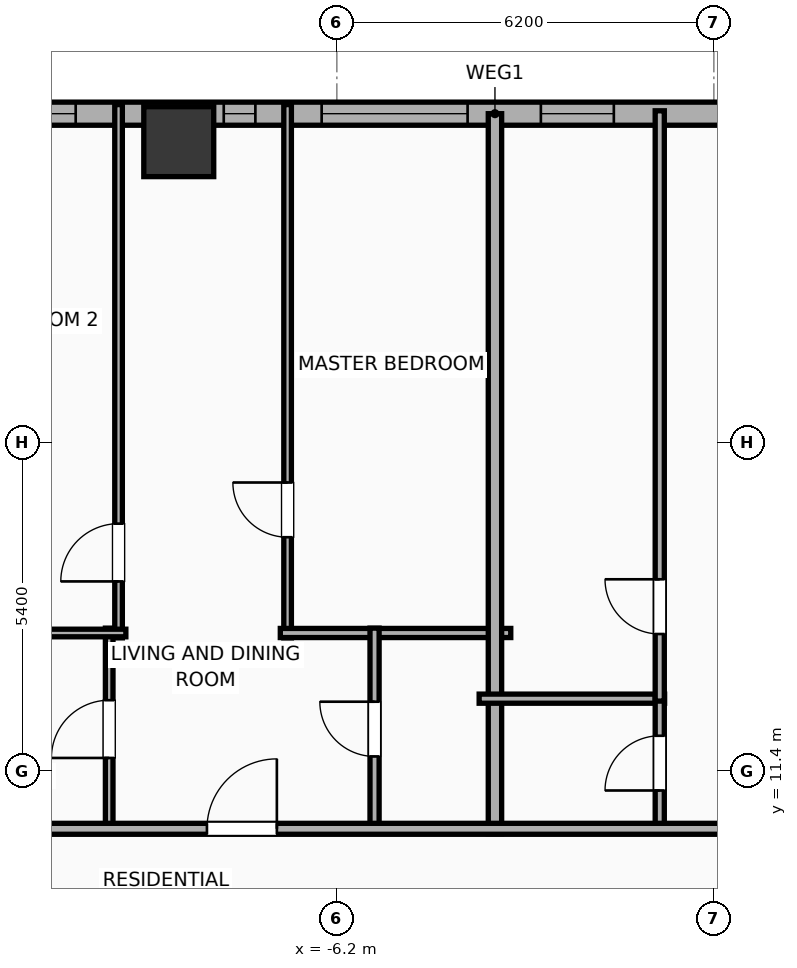
"""IFC4 building model, lengths in metres.
Left out: names, types, materials, properties, quantities, classifications, styles, units other than length and angle.
Written with IfcOpenShell. Run it as: python <this file> out.ifc"""

import sys

from ifc_helpers import new_model, si_unit, direction, frame, frame_2d, origin, origin_2d, place, context, subcontext, project, spatial, rectangle, hollow_rectangle, extrude, element, fill, save


model = new_model("IFC4")
c1 = context("Model", 3, precision=1e-05, world=origin(), true_north=direction((0.0, 1.0)))
c2 = subcontext(c1, "Body", "Model", "MODEL_VIEW")
j1 = project(units=[si_unit("LENGTHUNIT", "METRE"), si_unit("PLANEANGLEUNIT", "RADIAN")], contexts=[c1])
p1 = place(None, origin())
s1 = spatial("IfcSite", under=j1, at=p1, CompositionType="ELEMENT")
p2 = place(p1, origin())
s2 = spatial("IfcBuilding", under=s1, at=p2, CompositionType="ELEMENT")
p3 = place(p2, frame((0.0, 0.0, 72.8)))
s3 = spatial("IfcBuildingStorey", under=s2, at=p3, CompositionType="ELEMENT", Elevation=72.8)
p4 = place(p3, frame((-8.8, 21.75, 0.0), z_axis=(0.0, 0.0, 1.0), x_axis=(1.0, 0.0, 0.0)))
e1 = element("IfcColumn", 1, at=p4, inside=s3, PredefinedType="COLUMN", context=c2, shape_type="SweptSolid", body=[
    extrude(hollow_rectangle(XDim=1.15, YDim=1.15, WallThickness=0.04, at=origin_2d()), origin(), (0.0, 0.0, 1.0), 3.9),
])
p5 = place(p3, frame((-29.581, 22.21, 0.0), z_axis=(0.0, 0.0, 1.0), x_axis=(1.0, 0.0, 0.0)))
e2 = element("IfcWall", 2, at=p5, inside=s3, PredefinedType="ELEMENTEDWALL", context=c2, shape_type="SweptSolid", body=[
    extrude(rectangle(XDim=51.963, YDim=0.38, at=frame_2d((25.981, 0.0))), origin(), (0.0, 0.0, 1.0), 3.65),
])
p6 = place(p5, frame((5.81, 0.0, 0.75)))
e3 = element("IfcOpeningElement", 3, at=p6, cuts=e2, PredefinedType="OPENING", context=c2, shape_type="SweptSolid", body=[
    extrude(rectangle(XDim=2.4, YDim=2.1, at=frame_2d((1.2, 1.05))), frame((0.0, 0.2, 0.0), z_axis=(0.0, -1.0, 0.0), x_axis=(1.0, 0.0, 0.0)), (0.0, 0.0, 1.0), 0.4),
])
p7 = place(p5, frame((23.131, 0.0, 0.75)))
e4 = element("IfcOpeningElement", 4, at=p7, cuts=e2, PredefinedType="OPENING", context=c2, shape_type="SweptSolid", body=[
    extrude(rectangle(XDim=2.4, YDim=2.1, at=frame_2d((1.2, 1.05))), frame((0.0, 0.2, 0.0), z_axis=(0.0, -1.0, 0.0), x_axis=(1.0, 0.0, 0.0)), (0.0, 0.0, 1.0), 0.4),
])
p8 = place(p5, frame((43.752, 0.0, 0.75)))
e5 = element("IfcOpeningElement", 5, at=p8, cuts=e2, PredefinedType="OPENING", context=c2, shape_type="SweptSolid", body=[
    extrude(rectangle(XDim=2.4, YDim=2.1, at=frame_2d((1.2, 1.05))), frame((0.0, 0.2, 0.0), z_axis=(0.0, -1.0, 0.0), x_axis=(1.0, 0.0, 0.0)), (0.0, 0.0, 1.0), 0.4),
])
p9 = place(p5, frame((2.819, 0.0, 0.75)))
e6 = element("IfcOpeningElement", 6, at=p9, cuts=e2, PredefinedType="OPENING", context=c2, shape_type="SweptSolid", body=[
    extrude(rectangle(XDim=1.2, YDim=2.05, at=frame_2d((0.6, 1.025))), frame((0.0, 0.2, 0.0), z_axis=(0.0, -1.0, 0.0), x_axis=(1.0, 0.0, 0.0)), (0.0, 0.0, 1.0), 0.4),
])
p10 = place(p5, frame((11.781, 0.0, 0.75)))
e7 = element("IfcOpeningElement", 7, at=p10, cuts=e2, PredefinedType="OPENING", context=c2, shape_type="SweptSolid", body=[
    extrude(rectangle(XDim=1.2, YDim=2.05, at=frame_2d((0.6, 1.025))), frame((0.0, 0.2, 0.0), z_axis=(0.0, -1.0, 0.0), x_axis=(1.0, 0.0, 0.0)), (0.0, 0.0, 1.0), 0.4),
])
p11 = place(p5, frame((8.781, 0.0, 0.75)))
e8 = element("IfcOpeningElement", 8, at=p11, cuts=e2, PredefinedType="OPENING", context=c2, shape_type="SweptSolid", body=[
    extrude(rectangle(XDim=0.85, YDim=2.05, at=frame_2d((0.425, 1.025))), frame((0.0, 0.2, 0.0), z_axis=(0.0, -1.0, 0.0), x_axis=(1.0, 0.0, 0.0)), (0.0, 0.0, 1.0), 0.4),
])
p12 = place(p5, frame((14.876, 0.0, 0.75)))
e9 = element("IfcOpeningElement", 9, at=p12, cuts=e2, PredefinedType="OPENING", context=c2, shape_type="SweptSolid", body=[
    extrude(rectangle(XDim=1.2, YDim=2.05, at=frame_2d((0.6, 1.025))), frame((0.0, 0.2, 0.0), z_axis=(0.0, -1.0, 0.0), x_axis=(1.0, 0.0, 0.0)), (0.0, 0.0, 1.0), 0.4),
])
p13 = place(p5, frame((21.521, 0.0, 0.75)))
e10 = element("IfcOpeningElement", 10, at=p13, cuts=e2, PredefinedType="OPENING", context=c2, shape_type="SweptSolid", body=[
    extrude(rectangle(XDim=0.52, YDim=2.05, at=frame_2d((0.26, 1.025))), frame((0.0, 0.2, 0.0), z_axis=(0.0, -1.0, 0.0), x_axis=(1.0, 0.0, 0.0)), (0.0, 0.0, 1.0), 0.4),
])
p14 = place(p5, frame((17.886, 0.0, 0.75)))
e11 = element("IfcOpeningElement", 11, at=p14, cuts=e2, PredefinedType="OPENING", context=c2, shape_type="SweptSolid", body=[
    extrude(rectangle(XDim=1.2, YDim=2.05, at=frame_2d((0.6, 1.025))), frame((0.0, 0.2, 0.0), z_axis=(0.0, -1.0, 0.0), x_axis=(1.0, 0.0, 0.0)), (0.0, 0.0, 1.0), 0.4),
])
p15 = place(p5, frame((26.736, 0.0, 0.75)))
e12 = element("IfcOpeningElement", 12, at=p15, cuts=e2, PredefinedType="OPENING", context=c2, shape_type="SweptSolid", body=[
    extrude(rectangle(XDim=1.2, YDim=2.05, at=frame_2d((0.6, 1.025))), frame((0.0, 0.2, 0.0), z_axis=(0.0, -1.0, 0.0), x_axis=(1.0, 0.0, 0.0)), (0.0, 0.0, 1.0), 0.4),
])
p16 = place(p5, frame((31.976, 0.0, 0.75)))
e13 = element("IfcOpeningElement", 13, at=p16, cuts=e2, PredefinedType="OPENING", context=c2, shape_type="SweptSolid", body=[
    extrude(rectangle(XDim=1.2, YDim=2.05, at=frame_2d((0.6, 1.025))), frame((0.0, 0.2, 0.0), z_axis=(0.0, -1.0, 0.0), x_axis=(1.0, 0.0, 0.0)), (0.0, 0.0, 1.0), 0.4),
])
p17 = place(p5, frame((38.181, 0.0, 0.75)))
e14 = element("IfcOpeningElement", 14, at=p17, cuts=e2, PredefinedType="OPENING", context=c2, shape_type="SweptSolid", body=[
    extrude(rectangle(XDim=1.2, YDim=2.05, at=frame_2d((0.6, 1.025))), frame((0.0, 0.2, 0.0), z_axis=(0.0, -1.0, 0.0), x_axis=(1.0, 0.0, 0.0)), (0.0, 0.0, 1.0), 0.4),
])
p18 = place(p5, frame((35.486, 0.0, 0.75)))
e15 = element("IfcOpeningElement", 15, at=p18, cuts=e2, PredefinedType="OPENING", context=c2, shape_type="SweptSolid", body=[
    extrude(rectangle(XDim=1.2, YDim=2.05, at=frame_2d((0.6, 1.025))), frame((0.0, 0.2, 0.0), z_axis=(0.0, -1.0, 0.0), x_axis=(1.0, 0.0, 0.0)), (0.0, 0.0, 1.0), 0.4),
])
p19 = place(p5, frame((42.411, 0.0, 0.75)))
e16 = element("IfcOpeningElement", 16, at=p19, cuts=e2, PredefinedType="OPENING", context=c2, shape_type="SweptSolid", body=[
    extrude(rectangle(XDim=0.85, YDim=2.05, at=frame_2d((0.425, 1.025))), frame((0.0, 0.2, 0.0), z_axis=(0.0, -1.0, 0.0), x_axis=(1.0, 0.0, 0.0)), (0.0, 0.0, 1.0), 0.4),
])
p20 = place(p5, frame((47.943, 0.0, 0.75)))
e17 = element("IfcOpeningElement", 17, at=p20, cuts=e2, PredefinedType="OPENING", context=c2, shape_type="SweptSolid", body=[
    extrude(rectangle(XDim=1.2, YDim=2.05, at=frame_2d((0.6, 1.025))), frame((0.0, 0.2, 0.0), z_axis=(0.0, -1.0, 0.0), x_axis=(1.0, 0.0, 0.0)), (0.0, 0.0, 1.0), 0.4),
])
p21 = place(p5, frame((49.901, 0.0, 0.75)))
e18 = element("IfcOpeningElement", 18, at=p21, cuts=e2, PredefinedType="OPENING", context=c2, shape_type="SweptSolid", body=[
    extrude(rectangle(XDim=1.2, YDim=2.05, at=frame_2d((0.6, 1.025))), frame((0.0, 0.2, 0.0), z_axis=(0.0, -1.0, 0.0), x_axis=(1.0, 0.0, 0.0)), (0.0, 0.0, 1.0), 0.4),
])
p22 = place(p3, frame((-9.79, 13.59, 0.0), z_axis=(0.0, 0.0, 1.0), x_axis=(0.0, 1.0, 0.0)))
e19 = element("IfcWall", 19, at=p22, inside=s3, PredefinedType="PARTITIONING", context=c2, shape_type="SweptSolid", body=[
    extrude(rectangle(XDim=8.77, YDim=0.125, at=frame_2d((4.385, 0.0))), origin(), (0.0, 0.0, 1.0), 2.94),
])
p23 = place(p22, frame((0.928, 0.0, 0.0)))
e20 = element("IfcOpeningElement", 20, at=p23, cuts=e19, PredefinedType="OPENING", context=c2, shape_type="SweptSolid", body=[
    extrude(rectangle(XDim=0.95, YDim=2.05, at=frame_2d((0.475, 1.025))), frame((0.0, 0.073, 0.0), z_axis=(0.0, -1.0, 0.0), x_axis=(1.0, 0.0, 0.0)), (0.0, 0.0, 1.0), 0.145),
])
p24 = place(p3, frame((-7.01, 13.59, 0.0), z_axis=(0.0, 0.0, 1.0), x_axis=(0.0, 1.0, 0.0)))
e21 = element("IfcWall", 21, at=p24, inside=s3, PredefinedType="PARTITIONING", context=c2, shape_type="SweptSolid", body=[
    extrude(rectangle(XDim=8.77, YDim=0.125, at=frame_2d((4.385, 0.0))), origin(), (0.0, 0.0, 1.0), 3.65),
])
p25 = place(p24, frame((1.655, 0.0, 0.0)))
e22 = element("IfcOpeningElement", 22, at=p25, cuts=e21, PredefinedType="OPENING", context=c2, shape_type="SweptSolid", body=[
    extrude(rectangle(XDim=0.9, YDim=2.05, at=frame_2d((0.45, 1.025))), frame((0.0, 0.073, 0.0), z_axis=(0.0, -1.0, 0.0), x_axis=(1.0, 0.0, 0.0)), (0.0, 0.0, 1.0), 0.145),
])
p26 = place(p3, frame((-7.13, 13.67, 0.0), z_axis=(0.0, 0.0, 1.0), x_axis=(1.0, 0.0, 0.0)))
e23 = element("IfcWall", 23, at=p26, inside=s3, PredefinedType="PLUMBINGWALL", context=c2, shape_type="SweptSolid", body=[
    extrude(rectangle(XDim=3.79, YDim=0.15, at=frame_2d((1.895, 0.0))), origin(), (0.0, 0.0, 1.0), 3.65),
])
p27 = place(p3, frame((-9.944, 10.43, 0.0), z_axis=(0.0, 0.0, 1.0), x_axis=(0.0, 1.0, 0.0)))
e24 = element("IfcWall", 24, at=p27, inside=s3, PredefinedType="PARTITIONING", context=c2, shape_type="SweptSolid", body=[
    extrude(rectangle(XDim=3.32, YDim=0.125, at=frame_2d((1.66, 0.0))), origin(), (0.0, 0.0, 1.0), 3.65),
])
p28 = place(p27, frame((1.185, 0.0, 0.0)))
e25 = element("IfcOpeningElement", 25, at=p28, cuts=e24, PredefinedType="OPENING", context=c2, shape_type="SweptSolid", body=[
    extrude(rectangle(XDim=0.95, YDim=2.05, at=frame_2d((0.475, 1.025))), frame((0.0, 0.073, 0.0), z_axis=(0.0, -1.0, 0.0), x_axis=(1.0, 0.0, 0.0)), (0.0, 0.0, 1.0), 0.145),
])
p29 = place(p3, frame((-12.475, 13.67, 0.0), z_axis=(0.0, 0.0, 1.0), x_axis=(1.0, 0.0, 0.0)))
e26 = element("IfcWall", 26, at=p29, inside=s3, PredefinedType="PARTITIONING", context=c2, shape_type="SweptSolid", body=[
    extrude(rectangle(XDim=2.805, YDim=0.125, at=frame_2d((1.403, 0.0))), origin(), (0.0, 0.0, 1.0), 3.65),
])
p30 = place(p3, frame((-5.58, 10.43, 0.0), z_axis=(0.0, 0.0, 1.0), x_axis=(0.0, 1.0, 0.0)))
e27 = element("IfcWall", 27, at=p30, inside=s3, PredefinedType="PLUMBINGWALL", context=c2, shape_type="SweptSolid", body=[
    extrude(rectangle(XDim=3.32, YDim=0.15, at=frame_2d((1.66, 0.0))), origin(), (0.0, 0.0, 1.0), 3.65),
])
p31 = place(p30, frame((1.21, 0.0, 0.0)))
e28 = element("IfcOpeningElement", 28, at=p31, cuts=e27, PredefinedType="OPENING", context=c2, shape_type="SweptSolid", body=[
    extrude(rectangle(XDim=0.9, YDim=2.05, at=frame_2d((0.45, 1.025))), frame((0.0, 0.085, 0.0), z_axis=(0.0, -1.0, 0.0), x_axis=(1.0, 0.0, 0.0)), (0.0, 0.0, 1.0), 0.17),
])
p32 = place(p3, frame((-3.6, 10.37, 0.0), z_axis=(0.0, 0.0, 1.0), x_axis=(0.0, 1.0, 0.0)))
e29 = element("IfcWall", 29, at=p32, inside=s3, PredefinedType="PARTITIONING", context=c2, shape_type="SweptSolid", body=[
    extrude(rectangle(XDim=11.84, YDim=0.22, at=frame_2d((5.92, 0.0))), origin(), (0.0, 0.0, 1.0), 3.65),
])
p33 = place(p3, frame((-3.86, 12.59, 0.0), z_axis=(0.0, 0.0, 1.0), x_axis=(1.0, 0.0, 0.0)))
e30 = element("IfcWall", 30, at=p33, inside=s3, PredefinedType="PLUMBINGWALL", context=c2, shape_type="SweptSolid", body=[
    extrude(rectangle(XDim=3.05, YDim=0.15, at=frame_2d((1.525, 0.0))), origin(), (0.0, 0.0, 1.0), 3.65),
])
p34 = place(p3, frame((-0.89, 10.43, 0.0), z_axis=(0.0, 0.0, 1.0), x_axis=(0.0, 1.0, 0.0)))
e31 = element("IfcWall", 31, at=p34, inside=s3, PredefinedType="PLUMBINGWALL", context=c2, shape_type="SweptSolid", body=[
    extrude(rectangle(XDim=2.2, YDim=0.15, at=frame_2d((1.1, 0.0))), origin(), (0.0, 0.0, 1.0), 3.65),
])
p35 = place(p34, frame((0.65, 0.0, 0.0)))
e32 = element("IfcOpeningElement", 32, at=p35, cuts=e31, PredefinedType="OPENING", context=c2, shape_type="SweptSolid", body=[
    extrude(rectangle(XDim=0.9, YDim=2.05, at=frame_2d((0.45, 1.025))), frame((0.0, 0.085, 0.0), z_axis=(0.0, -1.0, 0.0), x_axis=(1.0, 0.0, 0.0)), (0.0, 0.0, 1.0), 0.17),
])
p36 = place(p3, frame((-0.89, 12.55, 0.0), z_axis=(0.0, 0.0, 1.0), x_axis=(0.0, 1.0, 0.0)))
e33 = element("IfcWall", 33, at=p36, inside=s3, PredefinedType="PLUMBINGWALL", context=c2, shape_type="SweptSolid", body=[
    extrude(rectangle(XDim=9.708, YDim=0.15, at=frame_2d((4.854, 0.0))), origin(), (0.0, 0.0, 1.0), 3.65),
])
p37 = place(p36, frame((1.103, 0.0, 0.0)))
e34 = element("IfcOpeningElement", 34, at=p37, cuts=e33, PredefinedType="OPENING", context=c2, shape_type="SweptSolid", body=[
    extrude(rectangle(XDim=0.9, YDim=2.05, at=frame_2d((0.45, 1.025))), frame((0.0, 0.085, 0.0), z_axis=(0.0, -1.0, 0.0), x_axis=(1.0, 0.0, 0.0)), (0.0, 0.0, 1.0), 0.17),
])
p38 = place(p3, frame((-33.41, 10.45, 0.0), z_axis=(0.0, 0.0, 1.0), x_axis=(1.0, 0.0, 0.0)))
e35 = element("IfcWall", 35, at=p38, inside=s3, PredefinedType="PARTITIONING", context=c2, shape_type="SweptSolid", body=[
    extrude(rectangle(XDim=59.62, YDim=0.18, at=frame_2d((29.81, 0.0))), origin(), (0.0, 0.0, 1.0), 3.65),
])
p39 = place(p38, frame((2.686, 0.0, 0.0)))
e36 = element("IfcOpeningElement", 36, at=p39, cuts=e35, PredefinedType="OPENING", context=c2, shape_type="SweptSolid", body=[
    extrude(rectangle(XDim=0.9, YDim=2.05, at=frame_2d((0.45, 1.025))), frame((0.0, 0.1, 0.0), z_axis=(0.0, -1.0, 0.0), x_axis=(1.0, 0.0, 0.0)), (0.0, 0.0, 1.0), 0.2),
])
p40 = place(p38, frame((9.698, 0.0, 0.0)))
e37 = element("IfcOpeningElement", 37, at=p40, cuts=e35, PredefinedType="OPENING", context=c2, shape_type="SweptSolid", body=[
    extrude(rectangle(XDim=1.15, YDim=2.05, at=frame_2d((0.575, 1.025))), frame((0.0, 0.1, 0.0), z_axis=(0.0, -1.0, 0.0), x_axis=(1.0, 0.0, 0.0)), (0.0, 0.0, 1.0), 0.2),
])
p41 = place(p38, frame((16.22, 0.0, 0.0)))
e38 = element("IfcOpeningElement", 38, at=p41, cuts=e35, PredefinedType="OPENING", context=c2, shape_type="SweptSolid", body=[
    extrude(rectangle(XDim=1.15, YDim=2.05, at=frame_2d((0.575, 1.025))), frame((0.0, 0.1, 0.0), z_axis=(0.0, -1.0, 0.0), x_axis=(1.0, 0.0, 0.0)), (0.0, 0.0, 1.0), 0.2),
])
p42 = place(p38, frame((25.073, 0.0, 0.0)))
e39 = element("IfcOpeningElement", 39, at=p42, cuts=e35, PredefinedType="OPENING", context=c2, shape_type="SweptSolid", body=[
    extrude(rectangle(XDim=1.15, YDim=2.05, at=frame_2d((0.575, 1.025))), frame((0.0, 0.1, 0.0), z_axis=(0.0, -1.0, 0.0), x_axis=(1.0, 0.0, 0.0)), (0.0, 0.0, 1.0), 0.2),
])
p43 = place(p38, frame((33.605, 0.0, 0.0)))
e40 = element("IfcOpeningElement", 40, at=p43, cuts=e35, PredefinedType="OPENING", context=c2, shape_type="SweptSolid", body=[
    extrude(rectangle(XDim=1.15, YDim=2.05, at=frame_2d((0.575, 1.025))), frame((0.0, 0.1, 0.0), z_axis=(0.0, -1.0, 0.0), x_axis=(1.0, 0.0, 0.0)), (0.0, 0.0, 1.0), 0.2),
])
p44 = place(p38, frame((42.649, 0.0, 0.0)))
e41 = element("IfcOpeningElement", 41, at=p44, cuts=e35, PredefinedType="OPENING", context=c2, shape_type="SweptSolid", body=[
    extrude(rectangle(XDim=1.15, YDim=2.05, at=frame_2d((0.575, 1.025))), frame((0.0, 0.1, 0.0), z_axis=(0.0, -1.0, 0.0), x_axis=(1.0, 0.0, 0.0)), (0.0, 0.0, 1.0), 0.2),
])
p45 = place(p38, frame((48.772, 0.0, 0.0)))
e42 = element("IfcOpeningElement", 42, at=p45, cuts=e35, PredefinedType="OPENING", context=c2, shape_type="SweptSolid", body=[
    extrude(rectangle(XDim=1.15, YDim=2.05, at=frame_2d((0.575, 1.025))), frame((0.0, 0.1, 0.0), z_axis=(0.0, -1.0, 0.0), x_axis=(1.0, 0.0, 0.0)), (0.0, 0.0, 1.0), 0.2),
])
p46 = place(p38, frame((56.272, 0.0, 0.0)))
e43 = element("IfcOpeningElement", 43, at=p46, cuts=e35, PredefinedType="OPENING", context=c2, shape_type="SweptSolid", body=[
    extrude(rectangle(XDim=0.9, YDim=2.05, at=frame_2d((0.45, 1.025))), frame((0.0, 0.1, 0.0), z_axis=(0.0, -1.0, 0.0), x_axis=(1.0, 0.0, 0.0)), (0.0, 0.0, 1.0), 0.2),
])
p47 = place(p7, origin())
e44 = element("IfcWindow", 44, at=p47, inside=s3, PartitioningType="SINGLE_PANEL", PredefinedType="WINDOW", context=c2, shape_type="SweptSolid", body=[
    extrude(rectangle(XDim=2.4, YDim=2.1, at=frame_2d((1.2, 1.05))), frame((0.0, 0.03, 0.0), z_axis=(0.0, -1.0, 0.0), x_axis=(1.0, 0.0, 0.0)), (0.0, 0.0, 1.0), 0.06),
])
fill(e4, e44)
p48 = place(p13, origin())
e45 = element("IfcWindow", 45, at=p48, inside=s3, PartitioningType="SINGLE_PANEL", PredefinedType="WINDOW", context=c2, shape_type="SweptSolid", body=[
    extrude(rectangle(XDim=0.52, YDim=2.05, at=frame_2d((0.26, 1.025))), frame((0.0, 0.03, 0.0), z_axis=(0.0, -1.0, 0.0), x_axis=(1.0, 0.0, 0.0)), (0.0, 0.0, 1.0), 0.06),
])
fill(e10, e45)
p49 = place(p14, origin())
e46 = element("IfcWindow", 46, at=p49, inside=s3, PartitioningType="SINGLE_PANEL", PredefinedType="WINDOW", context=c2, shape_type="SweptSolid", body=[
    extrude(rectangle(XDim=1.2, YDim=2.05, at=frame_2d((0.6, 1.025))), frame((0.0, 0.03, 0.0), z_axis=(0.0, -1.0, 0.0), x_axis=(1.0, 0.0, 0.0)), (0.0, 0.0, 1.0), 0.06),
])
fill(e11, e46)
p50 = place(p15, origin())
e47 = element("IfcWindow", 47, at=p50, inside=s3, PartitioningType="SINGLE_PANEL", PredefinedType="WINDOW", context=c2, shape_type="SweptSolid", body=[
    extrude(rectangle(XDim=1.2, YDim=2.05, at=frame_2d((0.6, 1.025))), frame((0.0, 0.03, 0.0), z_axis=(0.0, -1.0, 0.0), x_axis=(1.0, 0.0, 0.0)), (0.0, 0.0, 1.0), 0.06),
])
fill(e12, e47)
p51 = place(p23, origin())
e48 = element("IfcDoor", 48, at=p51, inside=s3, OperationType="SINGLE_SWING_LEFT", PredefinedType="DOOR", context=c2, shape_type="SweptSolid", body=[
    extrude(rectangle(XDim=0.95, YDim=2.05, at=frame_2d((0.475, 1.025))), frame((0.0, 0.025, 0.0), z_axis=(0.0, -1.0, 0.0), x_axis=(1.0, 0.0, 0.0)), (0.0, 0.0, 1.0), 0.05),
])
fill(e20, e48)
p52 = place(p25, origin())
e49 = element("IfcDoor", 49, at=p52, inside=s3, OperationType="SINGLE_SWING_RIGHT", PredefinedType="DOOR", context=c2, shape_type="SweptSolid", body=[
    extrude(rectangle(XDim=0.9, YDim=2.05, at=frame_2d((0.45, 1.025))), frame((0.0, 0.025, 0.0), z_axis=(0.0, -1.0, 0.0), x_axis=(1.0, 0.0, 0.0)), (0.0, 0.0, 1.0), 0.05),
])
fill(e22, e49)
p53 = place(p28, origin())
e50 = element("IfcDoor", 50, at=p53, inside=s3, OperationType="SINGLE_SWING_LEFT", PredefinedType="DOOR", context=c2, shape_type="SweptSolid", body=[
    extrude(rectangle(XDim=0.95, YDim=2.05, at=frame_2d((0.475, 1.025))), frame((0.0, 0.025, 0.0), z_axis=(0.0, -1.0, 0.0), x_axis=(1.0, 0.0, 0.0)), (0.0, 0.0, 1.0), 0.05),
])
fill(e25, e50)
p54 = place(p31, origin())
e51 = element("IfcDoor", 51, at=p54, inside=s3, OperationType="SINGLE_SWING_RIGHT", PredefinedType="DOOR", context=c2, shape_type="SweptSolid", body=[
    extrude(rectangle(XDim=0.9, YDim=2.05, at=frame_2d((0.45, 1.025))), frame((0.0, 0.025, 0.0), z_axis=(0.0, -1.0, 0.0), x_axis=(1.0, 0.0, 0.0)), (0.0, 0.0, 1.0), 0.05),
])
fill(e28, e51)
p55 = place(p35, origin())
e52 = element("IfcDoor", 52, at=p55, inside=s3, OperationType="SINGLE_SWING_LEFT", PredefinedType="DOOR", context=c2, shape_type="SweptSolid", body=[
    extrude(rectangle(XDim=0.9, YDim=2.05, at=frame_2d((0.45, 1.025))), frame((0.0, 0.025, 0.0), z_axis=(0.0, -1.0, 0.0), x_axis=(1.0, 0.0, 0.0)), (0.0, 0.0, 1.0), 0.05),
])
fill(e32, e52)
p56 = place(p37, origin())
e53 = element("IfcDoor", 53, at=p56, inside=s3, OperationType="SINGLE_SWING_RIGHT", PredefinedType="DOOR", context=c2, shape_type="SweptSolid", body=[
    extrude(rectangle(XDim=0.9, YDim=2.05, at=frame_2d((0.45, 1.025))), frame((0.0, 0.025, 0.0), z_axis=(0.0, -1.0, 0.0), x_axis=(1.0, 0.0, 0.0)), (0.0, 0.0, 1.0), 0.05),
])
fill(e34, e53)
p57 = place(p42, origin())
e54 = element("IfcDoor", 54, at=p57, inside=s3, OperationType="SINGLE_SWING_RIGHT", PredefinedType="DOOR", context=c2, shape_type="SweptSolid", body=[
    extrude(rectangle(XDim=1.15, YDim=2.05, at=frame_2d((0.575, 1.025))), frame((0.0, 0.025, 0.0), z_axis=(0.0, -1.0, 0.0), x_axis=(1.0, 0.0, 0.0)), (0.0, 0.0, 1.0), 0.05),
])
fill(e39, e54)
save(model, sys.argv[1])
